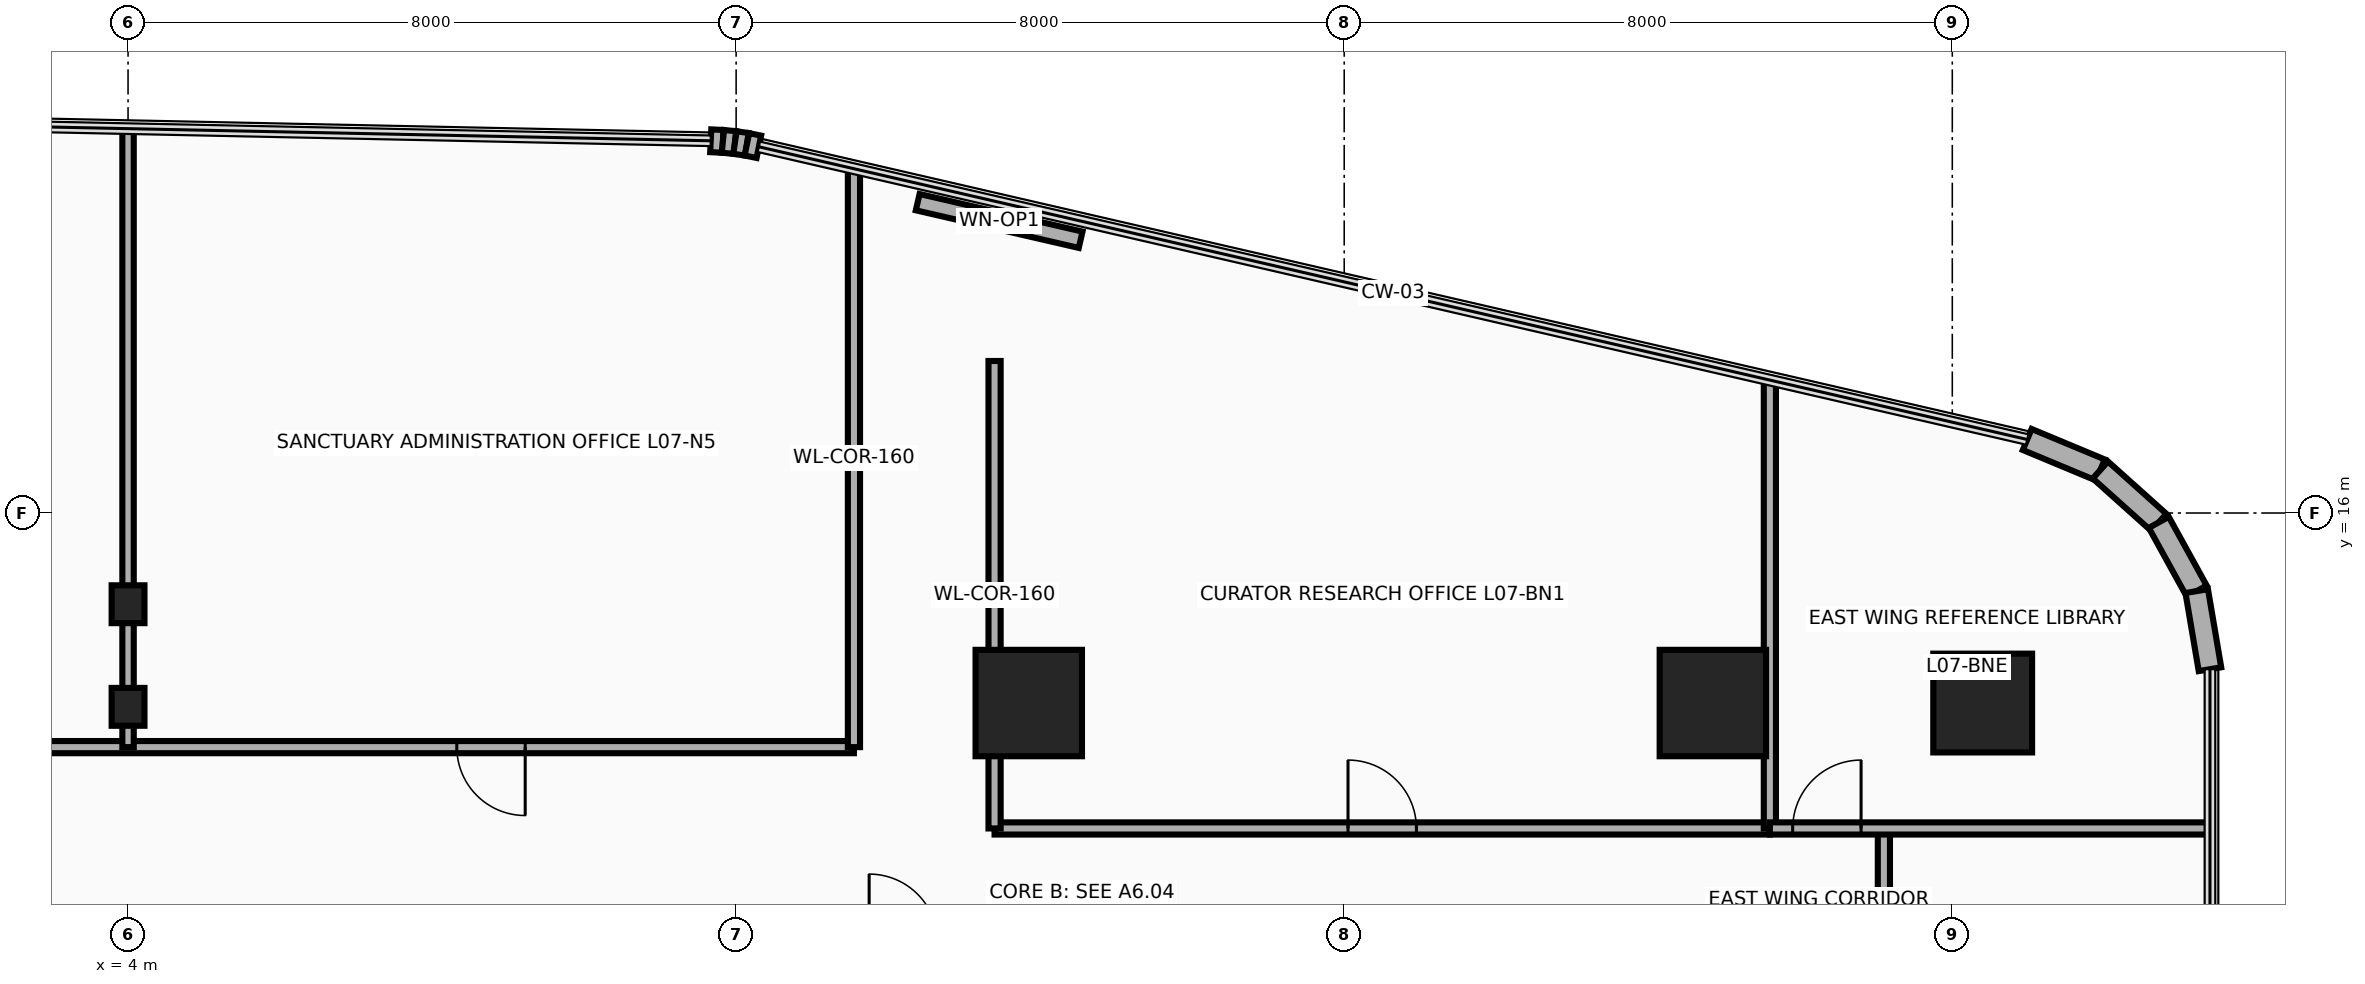
"""IFC4 building model, lengths in metres.
Left out: names, types, materials, properties, quantities, classifications, styles, units other than length and angle.
Written with IfcOpenShell. Run it as: python <this file> out.ifc"""

import sys

from ifc_helpers import new_model, si_unit, direction, frame, frame_2d, origin, origin_2d, place, context, subcontext, project, spatial, rectangle, circle, i_section, extrude, source, transform, mapped, element, fill, save


model = new_model("IFC4")
c1 = context("Model", 3, precision=1e-05, world=origin(), true_north=direction((0.0, 1.0)))
c2 = subcontext(c1, "Body", "Model", "MODEL_VIEW")
j1 = project(units=[si_unit("LENGTHUNIT", "METRE"), si_unit("PLANEANGLEUNIT", "RADIAN")], contexts=[c1])
p1 = place(None, origin())
s1 = spatial("IfcSite", under=j1, at=p1, CompositionType="ELEMENT")
p2 = place(p1, origin())
s2 = spatial("IfcBuilding", under=s1, at=p2, CompositionType="ELEMENT")
p3 = place(p2, frame((0.0, 0.0, 33.4)))
s3 = spatial("IfcBuildingStorey", under=s2, at=p3, CompositionType="ELEMENT", Elevation=33.4)
m1 = source(origin(), c2, "Body", "SweptSolid", [
    extrude(rectangle(XDim=1.4, YDim=1.4, at=origin_2d()), origin(), (0.0, 0.0, 1.0), 3.7),
])
for number, where, z_axis, x_axis in (
    (1, (15.85, 13.5, 0.0), (0.0, 0.0, 1.0), (1.0, 0.0, 0.0)),
    (2, (24.85, 13.5, 0.0), (0.0, 0.0, 1.0), (1.0, 0.0, 0.0)),
):
    element("IfcColumn", number, at=place(p3, frame(where, z_axis=z_axis, x_axis=x_axis)), inside=s3, PredefinedType="COLUMN", context=c2, shape_type="MappedRepresentation", body=[
        mapped(m1, transform((0.0, 0.0, 0.0), x_axis=(1.0, 0.0, 0.0), y_axis=(0.0, 1.0, 0.0), z_axis=(0.0, 0.0, 1.0), scale=1.0)),
    ])
m2 = source(origin(), c2, "Body", "SweptSolid", [
    extrude(circle(Radius=0.65, at=origin_2d()), origin(), (0.0, 0.0, 1.0), 3.7),
])
p4 = place(p3, frame((28.4, 13.5, 0.0), z_axis=(0.0, 0.0, 1.0), x_axis=(1.0, 0.0, 0.0)))
e3 = element("IfcColumn", 3, at=p4, inside=s3, PredefinedType="COLUMN", context=c2, shape_type="MappedRepresentation", body=[
    mapped(m2, transform((0.0, 0.0, 0.0), x_axis=(1.0, 0.0, 0.0), y_axis=(0.0, 1.0, 0.0), z_axis=(0.0, 0.0, 1.0), scale=1.0)),
])
m3 = source(origin(), c2, "Body", "SweptSolid", [
    extrude(i_section(OverallWidth=0.432, OverallDepth=0.498, WebThickness=0.056, FlangeThickness=0.089, at=origin_2d()), origin(), (0.0, 0.0, 1.0), 3.7),
])
for number, where, z_axis, x_axis in (
    (4, (4.0, 13.45, 0.0), (0.0, 0.0, 1.0), (1.0, 0.0, 0.0)),
    (5, (4.0, 14.8, 0.0), (0.0, 0.0, 1.0), (1.0, 0.0, 0.0)),
):
    element("IfcColumn", number, at=place(p3, frame(where, z_axis=z_axis, x_axis=x_axis)), inside=s3, PredefinedType="COLUMN", context=c2, shape_type="MappedRepresentation", body=[
        mapped(m3, transform((0.0, 0.0, 0.0), x_axis=(1.0, 0.0, 0.0), y_axis=(0.0, 1.0, 0.0), z_axis=(0.0, 0.0, 1.0), scale=1.0)),
    ])
p5 = place(p3, frame((11.666, 20.897, 0.0), z_axis=(0.0, 0.0, 1.0), x_axis=(0.998885297239, -0.047203421059, 0.0)))
e6 = element("IfcWall", 6, at=p5, inside=s3, PredefinedType="SOLIDWALL", context=c2, shape_type="SweptSolid", body=[
    extrude(rectangle(XDim=0.16, YDim=0.3, at=frame_2d((0.08, 0.0))), origin(), (0.0, 0.0, 1.0), 3.46),
])
p6 = place(p3, frame((11.826, 20.889, 0.0), z_axis=(0.0, 0.0, 1.0), x_axis=(0.995172891136, -0.098137234257, 0.0)))
e7 = element("IfcWall", 7, at=p6, inside=s3, PredefinedType="SOLIDWALL", context=c2, shape_type="SweptSolid", body=[
    extrude(rectangle(XDim=0.159, YDim=0.3, at=frame_2d((0.08, 0.0))), origin(), (0.0, 0.0, 1.0), 3.46),
])
p7 = place(p3, frame((11.984, 20.874, 0.0), z_axis=(0.0, 0.0, 1.0), x_axis=(0.988846069207, -0.148941100486, 0.0)))
e8 = element("IfcWall", 8, at=p7, inside=s3, PredefinedType="SOLIDWALL", context=c2, shape_type="SweptSolid", body=[
    extrude(rectangle(XDim=0.159, YDim=0.3, at=frame_2d((0.08, 0.0))), origin(), (0.0, 0.0, 1.0), 3.46),
])
p8 = place(p3, frame((12.142, 20.85, 0.0), z_axis=(0.0, 0.0, 1.0), x_axis=(0.979991950448, -0.19903712482, 0.0)))
e9 = element("IfcWall", 9, at=p8, inside=s3, PredefinedType="SOLIDWALL", context=c2, shape_type="SweptSolid", body=[
    extrude(rectangle(XDim=0.161, YDim=0.3, at=frame_2d((0.08, 0.0))), origin(), (0.0, 0.0, 1.0), 3.46),
])
p9 = place(p3, frame((14.389, 20.09, 0.0), z_axis=(0.0, 0.0, 1.0), x_axis=(0.974400545997, -0.224818984875, 0.0)))
e10 = element("IfcWall", 10, at=p9, inside=s3, PredefinedType="SOLIDWALL", context=c2, shape_type="SweptSolid", body=[
    extrude(rectangle(XDim=2.2, YDim=0.22, at=frame_2d((1.1, 0.0))), origin(), (0.0, 0.0, 1.0), 3.46),
])
p10 = place(p9, frame((0.65, 0.0, 0.95)))
e11 = element("IfcOpeningElement", 11, at=p10, cuts=e10, PredefinedType="OPENING", context=c2, shape_type="SweptSolid", body=[
    extrude(rectangle(XDim=0.9, YDim=1.3, at=frame_2d((0.45, 0.65))), frame((0.0, 0.125, 0.0), z_axis=(0.0, -1.0, 0.0), x_axis=(1.0, 0.0, 0.0)), (0.0, 0.0, 1.0), 0.25),
])
p11 = place(p3, frame((28.986, 16.967, 0.0), z_axis=(0.0, 0.0, 1.0), x_axis=(0.923083852684, -0.384598753136, 0.0)))
e12 = element("IfcWall", 12, at=p11, inside=s3, PredefinedType="SOLIDWALL", context=c2, shape_type="SweptSolid", body=[
    extrude(rectangle(XDim=1.042, YDim=0.3, at=frame_2d((0.521, 0.0))), origin(), (0.0, 0.0, 1.0), 3.46),
])
p12 = place(p3, frame((29.948, 16.566, 0.0), z_axis=(0.0, 0.0, 1.0), x_axis=(0.744585645533, -0.66752694063, 0.0)))
e13 = element("IfcWall", 13, at=p12, inside=s3, PredefinedType="SOLIDWALL", context=c2, shape_type="SweptSolid", body=[
    extrude(rectangle(XDim=1.033, YDim=0.3, at=frame_2d((0.517, 0.0))), origin(), (0.0, 0.0, 1.0), 3.46),
])
p13 = place(p3, frame((30.717, 15.877, 0.0), z_axis=(0.0, 0.0, 1.0), x_axis=(0.482971098131, -0.875636293429, 0.0)))
e14 = element("IfcWall", 14, at=p13, inside=s3, PredefinedType="SOLIDWALL", context=c2, shape_type="SweptSolid", body=[
    extrude(rectangle(XDim=1.033, YDim=0.3, at=frame_2d((0.516, 0.0))), origin(), (0.0, 0.0, 1.0), 3.46),
])
p14 = place(p3, frame((31.216, 14.973, 0.0), z_axis=(0.0, 0.0, 1.0), x_axis=(0.167019462117, -0.985953598946, 0.0)))
e15 = element("IfcWall", 15, at=p14, inside=s3, PredefinedType="SOLIDWALL", context=c2, shape_type="SweptSolid", body=[
    extrude(rectangle(XDim=1.042, YDim=0.3, at=frame_2d((0.521, 0.0))), origin(), (0.0, 0.0, 1.0), 3.46),
])
p15 = place(p3, frame((-31.89, 12.92, 0.0), z_axis=(0.0, 0.0, 1.0), x_axis=(1.0, 0.0, 0.0)))
e16 = element("IfcWall", 16, at=p15, inside=s3, PredefinedType="PARTITIONING", context=c2, shape_type="SweptSolid", body=[
    extrude(rectangle(XDim=45.44, YDim=0.16, at=frame_2d((22.72, 0.0))), origin(), (0.0, 0.0, 1.0), 2.583),
])
p16 = place(p15, frame((4.17, 0.0, 0.0)))
e17 = element("IfcOpeningElement", 17, at=p16, cuts=e16, PredefinedType="OPENING", context=c2, shape_type="SweptSolid", body=[
    extrude(rectangle(XDim=0.9, YDim=2.1, at=frame_2d((0.45, 1.05))), frame((0.0, 0.095, 0.0), z_axis=(0.0, -1.0, 0.0), x_axis=(1.0, 0.0, 0.0)), (0.0, 0.0, 1.0), 0.19),
])
p17 = place(p15, frame((13.915, 0.0, 0.0)))
e18 = element("IfcOpeningElement", 18, at=p17, cuts=e16, PredefinedType="OPENING", context=c2, shape_type="SweptSolid", body=[
    extrude(rectangle(XDim=0.9, YDim=2.1, at=frame_2d((0.45, 1.05))), frame((0.0, 0.095, 0.0), z_axis=(0.0, -1.0, 0.0), x_axis=(1.0, 0.0, 0.0)), (0.0, 0.0, 1.0), 0.19),
])
p18 = place(p15, frame((23.24, 0.0, 0.0)))
e19 = element("IfcOpeningElement", 19, at=p18, cuts=e16, PredefinedType="OPENING", context=c2, shape_type="SweptSolid", body=[
    extrude(rectangle(XDim=0.9, YDim=2.1, at=frame_2d((0.45, 1.05))), frame((0.0, 0.095, 0.0), z_axis=(0.0, -1.0, 0.0), x_axis=(1.0, 0.0, 0.0)), (0.0, 0.0, 1.0), 0.19),
])
p19 = place(p15, frame((31.44, 0.0, 0.0)))
e20 = element("IfcOpeningElement", 20, at=p19, cuts=e16, PredefinedType="OPENING", context=c2, shape_type="SweptSolid", body=[
    extrude(rectangle(XDim=0.9, YDim=2.1, at=frame_2d((0.45, 1.05))), frame((0.0, 0.095, 0.0), z_axis=(0.0, -1.0, 0.0), x_axis=(1.0, 0.0, 0.0)), (0.0, 0.0, 1.0), 0.19),
])
p20 = place(p15, frame((40.215, 0.0, 0.0)))
e21 = element("IfcOpeningElement", 21, at=p20, cuts=e16, PredefinedType="OPENING", context=c2, shape_type="SweptSolid", body=[
    extrude(rectangle(XDim=0.9, YDim=2.1, at=frame_2d((0.45, 1.05))), frame((0.0, 0.095, 0.0), z_axis=(0.0, -1.0, 0.0), x_axis=(1.0, 0.0, 0.0)), (0.0, 0.0, 1.0), 0.19),
])
p21 = place(p3, frame((13.55, 12.92, 0.0), z_axis=(0.0, 0.0, 1.0), x_axis=(0.0, 1.0, 0.0)))
e22 = element("IfcWall", 22, at=p21, inside=s3, PredefinedType="PARTITIONING", context=c2, shape_type="SweptSolid", body=[
    extrude(rectangle(XDim=7.609, YDim=0.16, at=frame_2d((3.805, 0.0))), origin(), (0.0, 0.0, 1.0), 2.583),
])
p22 = place(p3, frame((4.0, 12.92, 0.0), z_axis=(0.0, 0.0, 1.0), x_axis=(0.0, 1.0, 0.0)))
e23 = element("IfcWall", 23, at=p22, inside=s3, PredefinedType="PARTITIONING", context=c2, shape_type="SweptSolid", body=[
    extrude(rectangle(XDim=8.137, YDim=0.15, at=frame_2d((4.068, 0.0))), origin(), (0.0, 0.0, 1.0), 2.583),
])
p23 = place(p3, frame((15.4, 11.85, 0.0), z_axis=(0.0, 0.0, 1.0), x_axis=(1.0, 0.0, 0.0)))
e24 = element("IfcWall", 24, at=p23, inside=s3, PredefinedType="PARTITIONING", context=c2, shape_type="SweptSolid", body=[
    extrude(rectangle(XDim=10.2, YDim=0.16, at=frame_2d((5.1, 0.0))), origin(), (0.0, 0.0, 1.0), 2.834),
])
p24 = place(p23, frame((4.65, 0.0, 0.0)))
e25 = element("IfcOpeningElement", 25, at=p24, cuts=e24, PredefinedType="OPENING", context=c2, shape_type="SweptSolid", body=[
    extrude(rectangle(XDim=0.9, YDim=2.1, at=frame_2d((0.45, 1.05))), frame((0.0, 0.095, 0.0), z_axis=(0.0, -1.0, 0.0), x_axis=(1.0, 0.0, 0.0)), (0.0, 0.0, 1.0), 0.19),
])
p25 = place(p3, frame((15.4, 11.85, 0.0), z_axis=(0.0, 0.0, 1.0), x_axis=(0.0, 1.0, 0.0)))
e26 = element("IfcWall", 26, at=p25, inside=s3, PredefinedType="PARTITIONING", context=c2, shape_type="SweptSolid", body=[
    extrude(rectangle(XDim=6.15, YDim=0.16, at=frame_2d((3.075, 0.0))), origin(), (0.0, 0.0, 1.0), 2.583),
])
p26 = place(p3, frame((25.6, 11.85, 0.0), z_axis=(0.0, 0.0, 1.0), x_axis=(0.0, 1.0, 0.0)))
e27 = element("IfcWall", 27, at=p26, inside=s3, PredefinedType="PARTITIONING", context=c2, shape_type="SweptSolid", body=[
    extrude(rectangle(XDim=5.898, YDim=0.16, at=frame_2d((2.949, 0.0))), origin(), (0.0, 0.0, 1.0), 2.583),
])
p27 = place(p3, frame((27.1, -13.89, 0.0), z_axis=(0.0, 0.0, 1.0), x_axis=(0.0, 1.0, 0.0)))
e28 = element("IfcWall", 28, at=p27, inside=s3, PredefinedType="PARTITIONING", context=c2, shape_type="SweptSolid", body=[
    extrude(rectangle(XDim=25.74, YDim=0.16, at=frame_2d((12.87, 0.0))), origin(), (0.0, 0.0, 1.0), 2.583),
])
p28 = place(p27, frame((2.56, 0.0, 0.0)))
e29 = element("IfcOpeningElement", 29, at=p28, cuts=e28, PredefinedType="OPENING", context=c2, shape_type="SweptSolid", body=[
    extrude(rectangle(XDim=0.9, YDim=2.1, at=frame_2d((0.45, 1.05))), frame((0.0, 0.095, 0.0), z_axis=(0.0, -1.0, 0.0), x_axis=(1.0, 0.0, 0.0)), (0.0, 0.0, 1.0), 0.19),
])
p29 = place(p27, frame((12.16, 0.0, 0.0)))
e30 = element("IfcOpeningElement", 30, at=p29, cuts=e28, PredefinedType="OPENING", context=c2, shape_type="SweptSolid", body=[
    extrude(rectangle(XDim=0.9, YDim=2.1, at=frame_2d((0.45, 1.05))), frame((0.0, 0.095, 0.0), z_axis=(0.0, -1.0, 0.0), x_axis=(1.0, 0.0, 0.0)), (0.0, 0.0, 1.0), 0.19),
])
p30 = place(p27, frame((20.815, 0.0, 0.0)))
e31 = element("IfcOpeningElement", 31, at=p30, cuts=e28, PredefinedType="OPENING", context=c2, shape_type="SweptSolid", body=[
    extrude(rectangle(XDim=0.9, YDim=2.1, at=frame_2d((0.45, 1.05))), frame((0.0, 0.095, 0.0), z_axis=(0.0, -1.0, 0.0), x_axis=(1.0, 0.0, 0.0)), (0.0, 0.0, 1.0), 0.19),
])
p31 = place(p3, frame((25.6, 11.85, 0.0), z_axis=(0.0, 0.0, 1.0), x_axis=(1.0, 0.0, 0.0)))
e32 = element("IfcWall", 32, at=p31, inside=s3, PredefinedType="PARTITIONING", context=c2, shape_type="SweptSolid", body=[
    extrude(rectangle(XDim=5.79, YDim=0.16, at=frame_2d((2.895, 0.0))), origin(), (0.0, 0.0, 1.0), 2.896),
])
p32 = place(p31, frame((0.3, 0.0, 0.0)))
e33 = element("IfcOpeningElement", 33, at=p32, cuts=e32, PredefinedType="OPENING", context=c2, shape_type="SweptSolid", body=[
    extrude(rectangle(XDim=0.9, YDim=2.1, at=frame_2d((0.45, 1.05))), frame((0.0, 0.095, 0.0), z_axis=(0.0, -1.0, 0.0), x_axis=(1.0, 0.0, 0.0)), (0.0, 0.0, 1.0), 0.19),
])
p33 = place(p10, origin())
e34 = element("IfcWindow", 34, at=p33, inside=s3, PartitioningType="SINGLE_PANEL", PredefinedType="WINDOW", context=c2, shape_type="SweptSolid", body=[
    extrude(rectangle(XDim=0.9, YDim=1.3, at=frame_2d((0.45, 0.65))), frame((0.0, 0.03, 0.0), z_axis=(0.0, -1.0, 0.0), x_axis=(1.0, 0.0, 0.0)), (0.0, 0.0, 1.0), 0.06),
])
fill(e11, e34)
p34 = place(p20, frame((0.9, 0.0, 0.0), z_axis=(0.0, 0.0, 1.0), x_axis=(-1.0, 0.0, 0.0)))
e35 = element("IfcDoor", 35, at=p34, inside=s3, OperationType="SINGLE_SWING_LEFT", PredefinedType="DOOR", context=c2, shape_type="SweptSolid", body=[
    extrude(rectangle(XDim=0.9, YDim=2.1, at=frame_2d((0.45, 1.05))), frame((0.0, 0.025, 0.0), z_axis=(0.0, -1.0, 0.0), x_axis=(1.0, 0.0, 0.0)), (0.0, 0.0, 1.0), 0.05),
])
fill(e21, e35)
p35 = place(p24, origin())
e36 = element("IfcDoor", 36, at=p35, inside=s3, OperationType="SINGLE_SWING_RIGHT", PredefinedType="DOOR", context=c2, shape_type="SweptSolid", body=[
    extrude(rectangle(XDim=0.9, YDim=2.1, at=frame_2d((0.45, 1.05))), frame((0.0, 0.025, 0.0), z_axis=(0.0, -1.0, 0.0), x_axis=(1.0, 0.0, 0.0)), (0.0, 0.0, 1.0), 0.05),
])
fill(e25, e36)
p36 = place(p32, origin())
e37 = element("IfcDoor", 37, at=p36, inside=s3, OperationType="SINGLE_SWING_RIGHT", PredefinedType="DOOR", context=c2, shape_type="SweptSolid", body=[
    extrude(rectangle(XDim=0.9, YDim=2.1, at=frame_2d((0.45, 1.05))), frame((0.0, 0.025, 0.0), z_axis=(0.0, -1.0, 0.0), x_axis=(1.0, 0.0, 0.0)), (0.0, 0.0, 1.0), 0.05),
])
fill(e33, e37)
save(model, sys.argv[1])
